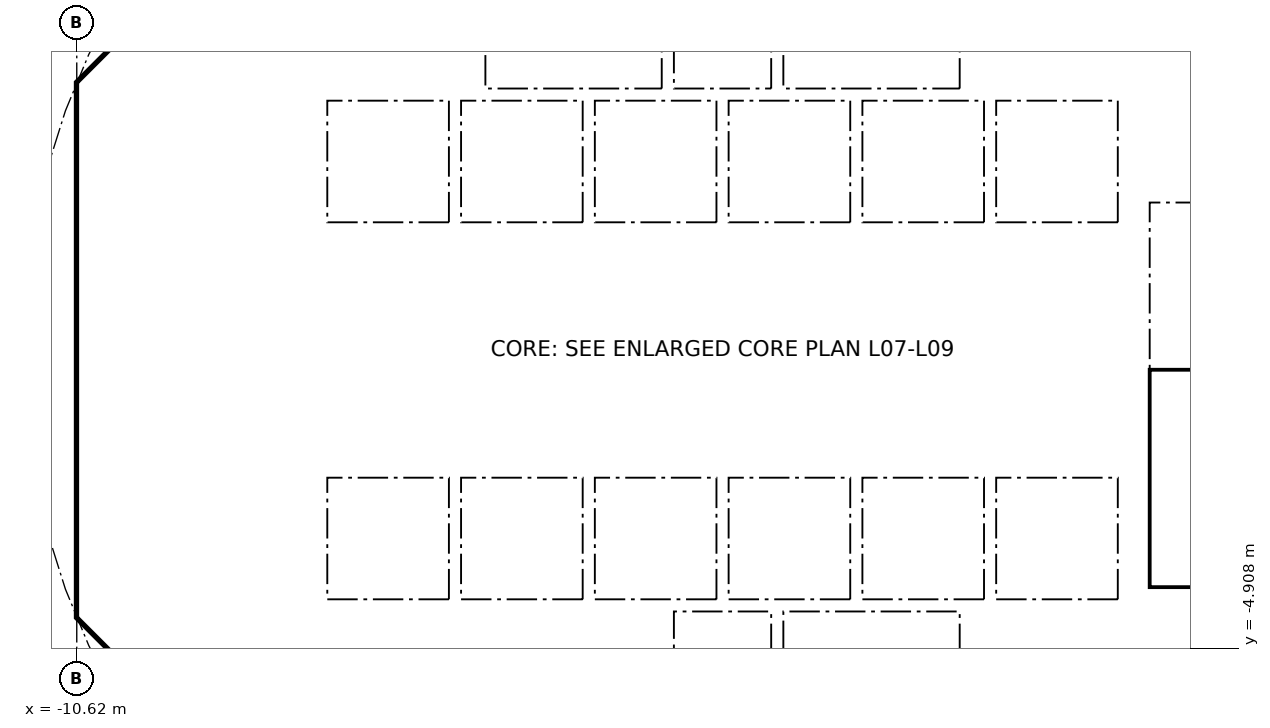
"""IFC4 building model, lengths in metres.
Left out: names, types, materials, properties, quantities, classifications, styles, units other than length and angle.
Written with IfcOpenShell. Run it as: python <this file> out.ifc"""

import sys

from ifc_helpers import new_model, si_unit, direction, frame, frame_2d, origin, place, context, subcontext, project, spatial, polyline, rectangle, outline, extrude, element, fill, save


model = new_model("IFC4")
c1 = context("Model", 3, precision=1e-05, world=origin(), true_north=direction((0.0, 1.0)))
c2 = subcontext(c1, "Body", "Model", "MODEL_VIEW")
j1 = project(units=[si_unit("LENGTHUNIT", "METRE"), si_unit("PLANEANGLEUNIT", "RADIAN")], contexts=[c1])
p1 = place(None, origin())
s1 = spatial("IfcSite", under=j1, at=p1, CompositionType="ELEMENT")
p2 = place(p1, origin())
s2 = spatial("IfcBuilding", under=s1, at=p2, CompositionType="ELEMENT")
p3 = place(p2, frame((0.0, 0.0, 41.8)))
s3 = spatial("IfcBuildingStorey", under=s2, at=p3, CompositionType="ELEMENT", Elevation=41.8)
p4 = place(p3, frame((9.988, 4.613, 0.0), z_axis=(0.0, 0.0, 1.0), x_axis=(-0.707106781187, 0.707106781187, 0.0)))
e1 = element("IfcWall", 1, at=p4, inside=s3, PredefinedType="SHEAR", context=c2, shape_type="SweptSolid", body=[
    extrude(rectangle(XDim=7.602, YDim=0.6, at=frame_2d((3.801, 0.0))), origin(), (0.0, 0.0, 1.0), 3.44),
])
p5 = place(p4, frame((3.201, 0.0, 0.0)))
e2 = element("IfcOpeningElement", 2, at=p5, cuts=e1, PredefinedType="OPENING", context=c2, shape_type="SweptSolid", body=[
    extrude(rectangle(XDim=1.2, YDim=2.1, at=frame_2d((0.6, 1.05))), frame((0.0, 0.31, 0.0), z_axis=(0.0, -1.0, 0.0), x_axis=(1.0, 0.0, 0.0)), (0.0, 0.0, 1.0), 0.62),
])
p6 = place(p3, frame((-4.613, 9.988, 0.0), z_axis=(0.0, 0.0, 1.0), x_axis=(-0.707106781187, -0.707106781187, 0.0)))
e3 = element("IfcWall", 3, at=p6, inside=s3, PredefinedType="SHEAR", context=c2, shape_type="SweptSolid", body=[
    extrude(rectangle(XDim=7.602, YDim=0.6, at=frame_2d((3.801, 0.0))), origin(), (0.0, 0.0, 1.0), 3.44),
])
p7 = place(p6, frame((0.351, 0.0, 0.0)))
e4 = element("IfcOpeningElement", 4, at=p7, cuts=e3, PredefinedType="OPENING", context=c2, shape_type="SweptSolid", body=[
    extrude(rectangle(XDim=1.1, YDim=2.1, at=frame_2d((0.55, 1.05))), frame((0.0, 0.31, 0.0), z_axis=(0.0, -1.0, 0.0), x_axis=(1.0, 0.0, 0.0)), (0.0, 0.0, 1.0), 0.62),
])
p8 = place(p3, frame((-10.325, 3.801, 0.0), z_axis=(0.0, 0.0, 1.0), x_axis=(0.0, -1.0, 0.0)))
e5 = element("IfcWall", 5, at=p8, inside=s3, PredefinedType="SHEAR", context=c2, shape_type="SweptSolid", body=[
    extrude(rectangle(XDim=7.602, YDim=0.6, at=frame_2d((3.801, 0.0))), origin(), (0.0, 0.0, 1.0), 3.44),
])
p9 = place(p8, frame((0.651, 0.0, 0.0)))
e6 = element("IfcOpeningElement", 6, at=p9, cuts=e5, PredefinedType="OPENING", context=c2, shape_type="SweptSolid", body=[
    extrude(rectangle(XDim=1.5, YDim=2.1, at=frame_2d((0.75, 1.05))), frame((0.0, 0.31, 0.0), z_axis=(0.0, -1.0, 0.0), x_axis=(1.0, 0.0, 0.0)), (0.0, 0.0, 1.0), 0.62),
])
p10 = place(p8, frame((5.451, 0.0, 0.0)))
e7 = element("IfcOpeningElement", 7, at=p10, cuts=e5, PredefinedType="OPENING", context=c2, shape_type="SweptSolid", body=[
    extrude(rectangle(XDim=1.5, YDim=2.1, at=frame_2d((0.75, 1.05))), frame((0.0, 0.31, 0.0), z_axis=(0.0, -1.0, 0.0), x_axis=(1.0, 0.0, 0.0)), (0.0, 0.0, 1.0), 0.62),
])
p11 = place(p3, frame((-9.988, -4.613, 0.0), z_axis=(0.0, 0.0, 1.0), x_axis=(0.707106781187, -0.707106781187, 0.0)))
e8 = element("IfcWall", 8, at=p11, inside=s3, PredefinedType="SHEAR", context=c2, shape_type="SweptSolid", body=[
    extrude(rectangle(XDim=7.602, YDim=0.6, at=frame_2d((3.801, 0.0))), origin(), (0.0, 0.0, 1.0), 3.44),
])
p12 = place(p11, frame((6.151, 0.0, 0.0)))
e9 = element("IfcOpeningElement", 9, at=p12, cuts=e8, PredefinedType="OPENING", context=c2, shape_type="SweptSolid", body=[
    extrude(rectangle(XDim=1.1, YDim=2.1, at=frame_2d((0.55, 1.05))), frame((0.0, 0.31, 0.0), z_axis=(0.0, -1.0, 0.0), x_axis=(1.0, 0.0, 0.0)), (0.0, 0.0, 1.0), 0.62),
])
p13 = place(p3, frame((4.613, -9.988, 0.0), z_axis=(0.0, 0.0, 1.0), x_axis=(0.707106781187, 0.707106781187, 0.0)))
e10 = element("IfcWall", 10, at=p13, inside=s3, PredefinedType="SHEAR", context=c2, shape_type="SweptSolid", body=[
    extrude(rectangle(XDim=7.602, YDim=0.6, at=frame_2d((3.801, 0.0))), origin(), (0.0, 0.0, 1.0), 3.44),
])
p14 = place(p13, frame((3.201, 0.0, 0.0)))
e11 = element("IfcOpeningElement", 11, at=p14, cuts=e10, PredefinedType="OPENING", context=c2, shape_type="SweptSolid", body=[
    extrude(rectangle(XDim=1.2, YDim=2.1, at=frame_2d((0.6, 1.05))), frame((0.0, 0.31, 0.0), z_axis=(0.0, -1.0, 0.0), x_axis=(1.0, 0.0, 0.0)), (0.0, 0.0, 1.0), 0.62),
])
p15 = place(p3, frame((-6.2, 4.3, 0.0), z_axis=(0.0, 0.0, 1.0), x_axis=(0.0, 1.0, 0.0)))
e12 = element("IfcWall", 12, at=p15, inside=s3, PredefinedType="PARTITIONING", context=c2, shape_type="SweptSolid", body=[
    extrude(rectangle(XDim=3.527, YDim=0.15, at=frame_2d((1.763, 0.0))), origin(), (0.0, 0.0, 1.0), 3.44),
])
p16 = place(p15, frame((0.262, 0.0, 0.0)))
e13 = element("IfcOpeningElement", 13, at=p16, cuts=e12, PredefinedType="OPENING", context=c2, shape_type="SweptSolid", body=[
    extrude(rectangle(XDim=0.9, YDim=2.1, at=frame_2d((0.45, 1.05))), frame((0.0, 0.085, 0.0), z_axis=(0.0, -1.0, 0.0), x_axis=(1.0, 0.0, 0.0)), (0.0, 0.0, 1.0), 0.17),
])
p17 = place(p15, frame((2.138, 0.0, 0.0)))
e14 = element("IfcOpeningElement", 14, at=p17, cuts=e12, PredefinedType="OPENING", context=c2, shape_type="SweptSolid", body=[
    extrude(rectangle(XDim=0.9, YDim=2.1, at=frame_2d((0.45, 1.05))), frame((0.0, 0.085, 0.0), z_axis=(0.0, -1.0, 0.0), x_axis=(1.0, 0.0, 0.0)), (0.0, 0.0, 1.0), 0.17),
])
p18 = place(p3, frame((4.0, 4.3, 0.0), z_axis=(0.0, 0.0, 1.0), x_axis=(0.0, 1.0, 0.0)))
e15 = element("IfcWall", 15, at=p18, inside=s3, PredefinedType="SOLIDWALL", context=c2, shape_type="SweptSolid", body=[
    extrude(rectangle(XDim=2.2, YDim=0.2, at=frame_2d((1.1, 0.0))), origin(), (0.0, 0.0, 1.0), 3.44),
])
p19 = place(p18, frame((0.55, 0.0, 0.0)))
e16 = element("IfcOpeningElement", 16, at=p19, cuts=e15, PredefinedType="OPENING", context=c2, shape_type="SweptSolid", body=[
    extrude(rectangle(XDim=1.1, YDim=2.1, at=frame_2d((0.55, 1.05))), frame((0.0, 0.11, 0.0), z_axis=(0.0, -1.0, 0.0), x_axis=(1.0, 0.0, 0.0)), (0.0, 0.0, 1.0), 0.22),
])
p20 = place(p3, frame((-4.0, 4.3, 0.0), z_axis=(0.0, 0.0, 1.0), x_axis=(0.0, 1.0, 0.0)))
e17 = element("IfcWall", 17, at=p20, inside=s3, PredefinedType="SOLIDWALL", context=c2, shape_type="SweptSolid", body=[
    extrude(rectangle(XDim=2.2, YDim=0.2, at=frame_2d((1.1, 0.0))), origin(), (0.0, 0.0, 1.0), 3.44),
])
p21 = place(p20, frame((0.55, 0.0, 0.0)))
e18 = element("IfcOpeningElement", 18, at=p21, cuts=e17, PredefinedType="OPENING", context=c2, shape_type="SweptSolid", body=[
    extrude(rectangle(XDim=1.1, YDim=2.1, at=frame_2d((0.55, 1.05))), frame((0.0, 0.11, 0.0), z_axis=(0.0, -1.0, 0.0), x_axis=(1.0, 0.0, 0.0)), (0.0, 0.0, 1.0), 0.22),
])
p22 = place(p3, frame((-6.7, 2.0, 0.0), z_axis=(0.0, 0.0, 1.0), x_axis=(1.0, 0.0, 0.0)))
e19 = element("IfcWall", 19, at=p22, inside=s3, PredefinedType="SOLIDWALL", context=c2, shape_type="SweptSolid", body=[
    extrude(rectangle(XDim=13.4, YDim=0.2, at=frame_2d((6.7, 0.0))), origin(), (0.0, 0.0, 1.0), 3.44),
])
p23 = place(p22, frame((0.65, 0.0, 0.0)))
e20 = element("IfcOpeningElement", 20, at=p23, cuts=e19, PredefinedType="OPENING", context=c2, shape_type="SweptSolid", body=[
    extrude(rectangle(XDim=1.1, YDim=2.1, at=frame_2d((0.55, 1.05))), frame((0.0, 0.11, 0.0), z_axis=(0.0, -1.0, 0.0), x_axis=(1.0, 0.0, 0.0)), (0.0, 0.0, 1.0), 0.22),
])
p24 = place(p22, frame((2.85, 0.0, 0.0)))
e21 = element("IfcOpeningElement", 21, at=p24, cuts=e19, PredefinedType="OPENING", context=c2, shape_type="SweptSolid", body=[
    extrude(rectangle(XDim=1.1, YDim=2.1, at=frame_2d((0.55, 1.05))), frame((0.0, 0.11, 0.0), z_axis=(0.0, -1.0, 0.0), x_axis=(1.0, 0.0, 0.0)), (0.0, 0.0, 1.0), 0.22),
])
p25 = place(p22, frame((5.05, 0.0, 0.0)))
e22 = element("IfcOpeningElement", 22, at=p25, cuts=e19, PredefinedType="OPENING", context=c2, shape_type="SweptSolid", body=[
    extrude(rectangle(XDim=1.1, YDim=2.1, at=frame_2d((0.55, 1.05))), frame((0.0, 0.11, 0.0), z_axis=(0.0, -1.0, 0.0), x_axis=(1.0, 0.0, 0.0)), (0.0, 0.0, 1.0), 0.22),
])
p26 = place(p3, frame((6.7, 4.0, 0.0), z_axis=(0.0, 0.0, 1.0), x_axis=(1.0, 0.0, 0.0)))
e23 = element("IfcWall", 23, at=p26, inside=s3, PredefinedType="SOLIDWALL", context=c2, shape_type="SweptSolid", body=[
    extrude(rectangle(XDim=3.325, YDim=0.2, at=frame_2d((1.662, 0.0))), origin(), (0.0, 0.0, 1.0), 3.44),
])
p27 = place(p26, frame((1.25, 0.0, 0.0)))
e24 = element("IfcOpeningElement", 24, at=p27, cuts=e23, PredefinedType="OPENING", context=c2, shape_type="SweptSolid", body=[
    extrude(rectangle(XDim=1.1, YDim=2.1, at=frame_2d((0.55, 1.05))), frame((0.0, 0.11, 0.0), z_axis=(0.0, -1.0, 0.0), x_axis=(1.0, 0.0, 0.0)), (0.0, 0.0, 1.0), 0.22),
])
p28 = place(p3, frame((-6.2, -7.827, 0.0), z_axis=(0.0, 0.0, 1.0), x_axis=(0.0, 1.0, 0.0)))
e25 = element("IfcWall", 25, at=p28, inside=s3, PredefinedType="PARTITIONING", context=c2, shape_type="SweptSolid", body=[
    extrude(rectangle(XDim=3.527, YDim=0.15, at=frame_2d((1.763, 0.0))), origin(), (0.0, 0.0, 1.0), 3.44),
])
p29 = place(p28, frame((2.365, 0.0, 0.0)))
e26 = element("IfcOpeningElement", 26, at=p29, cuts=e25, PredefinedType="OPENING", context=c2, shape_type="SweptSolid", body=[
    extrude(rectangle(XDim=0.9, YDim=2.1, at=frame_2d((0.45, 1.05))), frame((0.0, 0.085, 0.0), z_axis=(0.0, -1.0, 0.0), x_axis=(1.0, 0.0, 0.0)), (0.0, 0.0, 1.0), 0.17),
])
p30 = place(p28, frame((0.489, 0.0, 0.0)))
e27 = element("IfcOpeningElement", 27, at=p30, cuts=e25, PredefinedType="OPENING", context=c2, shape_type="SweptSolid", body=[
    extrude(rectangle(XDim=0.9, YDim=2.1, at=frame_2d((0.45, 1.05))), frame((0.0, 0.085, 0.0), z_axis=(0.0, -1.0, 0.0), x_axis=(1.0, 0.0, 0.0)), (0.0, 0.0, 1.0), 0.17),
])
p31 = place(p3, frame((4.0, -6.5, 0.0), z_axis=(0.0, 0.0, 1.0), x_axis=(0.0, 1.0, 0.0)))
e28 = element("IfcWall", 28, at=p31, inside=s3, PredefinedType="SOLIDWALL", context=c2, shape_type="SweptSolid", body=[
    extrude(rectangle(XDim=2.2, YDim=0.2, at=frame_2d((1.1, 0.0))), origin(), (0.0, 0.0, 1.0), 3.44),
])
p32 = place(p31, frame((0.55, 0.0, 0.0)))
e29 = element("IfcOpeningElement", 29, at=p32, cuts=e28, PredefinedType="OPENING", context=c2, shape_type="SweptSolid", body=[
    extrude(rectangle(XDim=1.1, YDim=2.1, at=frame_2d((0.55, 1.05))), frame((0.0, 0.11, 0.0), z_axis=(0.0, -1.0, 0.0), x_axis=(1.0, 0.0, 0.0)), (0.0, 0.0, 1.0), 0.22),
])
p33 = place(p3, frame((-4.0, -6.5, 0.0), z_axis=(0.0, 0.0, 1.0), x_axis=(0.0, 1.0, 0.0)))
e30 = element("IfcWall", 30, at=p33, inside=s3, PredefinedType="SOLIDWALL", context=c2, shape_type="SweptSolid", body=[
    extrude(rectangle(XDim=2.2, YDim=0.2, at=frame_2d((1.1, 0.0))), origin(), (0.0, 0.0, 1.0), 3.44),
])
p34 = place(p33, frame((0.65, 0.0, 0.0)))
e31 = element("IfcOpeningElement", 31, at=p34, cuts=e30, PredefinedType="OPENING", context=c2, shape_type="SweptSolid", body=[
    extrude(rectangle(XDim=0.9, YDim=2.1, at=frame_2d((0.45, 1.05))), frame((0.0, 0.11, 0.0), z_axis=(0.0, -1.0, 0.0), x_axis=(1.0, 0.0, 0.0)), (0.0, 0.0, 1.0), 0.22),
])
p35 = place(p3, frame((-6.7, -2.0, 0.0), z_axis=(0.0, 0.0, 1.0), x_axis=(1.0, 0.0, 0.0)))
e32 = element("IfcWall", 32, at=p35, inside=s3, PredefinedType="SOLIDWALL", context=c2, shape_type="SweptSolid", body=[
    extrude(rectangle(XDim=13.4, YDim=0.2, at=frame_2d((6.7, 0.0))), origin(), (0.0, 0.0, 1.0), 3.44),
])
p36 = place(p35, frame((0.65, 0.0, 0.0)))
e33 = element("IfcOpeningElement", 33, at=p36, cuts=e32, PredefinedType="OPENING", context=c2, shape_type="SweptSolid", body=[
    extrude(rectangle(XDim=1.1, YDim=2.1, at=frame_2d((0.55, 1.05))), frame((0.0, 0.11, 0.0), z_axis=(0.0, -1.0, 0.0), x_axis=(1.0, 0.0, 0.0)), (0.0, 0.0, 1.0), 0.22),
])
p37 = place(p35, frame((2.85, 0.0, 0.0)))
e34 = element("IfcOpeningElement", 34, at=p37, cuts=e32, PredefinedType="OPENING", context=c2, shape_type="SweptSolid", body=[
    extrude(rectangle(XDim=1.1, YDim=2.1, at=frame_2d((0.55, 1.05))), frame((0.0, 0.11, 0.0), z_axis=(0.0, -1.0, 0.0), x_axis=(1.0, 0.0, 0.0)), (0.0, 0.0, 1.0), 0.22),
])
p38 = place(p3, origin())
e35 = element("IfcWall", 35, at=p38, inside=s3, PredefinedType="SHEAR", context=c2, shape_type="SweptSolid", body=[
    extrude(outline(polyline([(-10.625, -3.801), (-10.025, -3.801), (-10.025, -4.152), (-9.776, -4.401), (-10.2, -4.825), (-10.625, -4.401), (-10.625, -3.801)])), origin(), (0.0, 0.0, 1.0), 3.44),
])
p39 = place(p3, origin())
e36 = element("IfcWall", 36, at=p39, inside=s3, PredefinedType="SHEAR", context=c2, shape_type="SweptSolid", body=[
    extrude(outline(polyline([(-10.2, 4.825), (-9.776, 4.401), (-10.025, 4.152), (-10.025, 3.801), (-10.625, 3.801), (-10.625, 4.401), (-10.2, 4.825)])), origin(), (0.0, 0.0, 1.0), 3.44),
])
for number, where, z_axis, x_axis in (
    (37, (-10.025, -4.0, 0.0), (0.0, 0.0, 1.0), (1.0, 0.0, 0.0)),
    (38, (-10.025, 4.0, 0.0), (0.0, 0.0, 1.0), (1.0, 0.0, 0.0)),
):
    element("IfcWall", number, at=place(p3, frame(where, z_axis=z_axis, x_axis=x_axis)), inside=s3, PredefinedType="PARTITIONING", context=c2, shape_type="SweptSolid", body=[
        extrude(rectangle(XDim=3.325, YDim=0.2, at=frame_2d((1.662, 0.0))), origin(), (0.0, 0.0, 1.0), 3.44),
    ])
for number, where, z_axis, x_axis in (
    (39, (-0.9, -6.5, 0.0), (0.0, 0.0, 1.0), (0.0, 1.0, 0.0)),
    (40, (0.9, -6.5, 0.0), (0.0, 0.0, 1.0), (0.0, 1.0, 0.0)),
):
    element("IfcWall", number, at=place(p3, frame(where, z_axis=z_axis, x_axis=x_axis)), inside=s3, PredefinedType="SOLIDWALL", context=c2, shape_type="SweptSolid", body=[
        extrude(rectangle(XDim=2.2, YDim=0.2, at=frame_2d((1.1, 0.0))), origin(), (0.0, 0.0, 1.0), 3.44),
    ])
p40 = place(p3, origin())
e41 = element("IfcWall", 41, at=p40, inside=s3, PredefinedType="SOLIDWALL", context=c2, shape_type="SweptSolid", body=[
    extrude(outline(polyline([(-6.7, -2.1), (-6.5, -2.1), (-6.5, -4.1), (-4.5, -4.1), (-4.5, -2.1), (-4.3, -2.1), (-4.3, -4.1), (-2.3, -4.1), (-2.3, -2.1), (-2.1, -2.1), (-2.1, -4.1), (-0.1, -4.1), (-0.1, -2.1), (0.1, -2.1), (0.1, -4.1), (2.1, -4.1), (2.1, -2.1), (2.3, -2.1), (2.3, -4.1), (4.3, -4.1), (4.3, -2.1), (4.5, -2.1), (4.5, -4.1), (6.5, -4.1), (6.5, -2.1), (6.7, -2.1), (6.7, -4.3), (-6.7, -4.3), (-6.7, -2.1)])), origin(), (0.0, 0.0, 1.0), 3.44),
])
for number, where, z_axis, x_axis in (
    (42, (-0.9, 4.3, 0.0), (0.0, 0.0, 1.0), (0.0, 1.0, 0.0)),
    (43, (0.9, 4.3, 0.0), (0.0, 0.0, 1.0), (0.0, 1.0, 0.0)),
):
    element("IfcWall", number, at=place(p3, frame(where, z_axis=z_axis, x_axis=x_axis)), inside=s3, PredefinedType="SOLIDWALL", context=c2, shape_type="SweptSolid", body=[
        extrude(rectangle(XDim=2.2, YDim=0.2, at=frame_2d((1.1, 0.0))), origin(), (0.0, 0.0, 1.0), 3.44),
    ])
p41 = place(p3, origin())
e44 = element("IfcWall", 44, at=p41, inside=s3, PredefinedType="SOLIDWALL", context=c2, shape_type="SweptSolid", body=[
    extrude(outline(polyline([(-6.5, 2.1), (-6.7, 2.1), (-6.7, 4.3), (6.7, 4.3), (6.7, 2.1), (6.5, 2.1), (6.5, 4.1), (4.5, 4.1), (4.5, 2.1), (4.3, 2.1), (4.3, 4.1), (2.3, 4.1), (2.3, 2.1), (2.1, 2.1), (2.1, 4.1), (0.1, 4.1), (0.1, 2.1), (-0.1, 2.1), (-0.1, 4.1), (-2.1, 4.1), (-2.1, 2.1), (-2.3, 2.1), (-2.3, 4.1), (-4.3, 4.1), (-4.3, 2.1), (-4.5, 2.1), (-4.5, 4.1), (-6.5, 4.1), (-6.5, 2.1)])), origin(), (0.0, 0.0, 1.0), 3.44),
])
p42 = place(p3, origin())
e45 = element("IfcWall", 45, at=p42, inside=s3, PredefinedType="SOLIDWALL", context=c2, shape_type="SweptSolid", body=[
    extrude(outline(polyline([(7.025, -3.9), (6.7, -3.9), (6.7, 3.9), (7.025, 3.9), (7.025, -3.9)])), origin(), (0.0, 0.0, 1.0), 3.44),
])
p43 = place(p3, origin())
e46 = element("IfcWall", 46, at=p43, inside=s3, PredefinedType="SOLIDWALL", context=c2, shape_type="SweptSolid", body=[
    extrude(outline(polyline([(10.025, -4.1), (6.7, -4.1), (6.7, -3.9), (10.025, -3.9), (10.025, -4.1)])), origin(), (0.0, 0.0, 1.0), 3.44),
])
p44 = place(p23, origin())
e47 = element("IfcDoor", 47, at=p44, inside=s3, OperationType="DOUBLE_DOOR_SLIDING", PredefinedType="DOOR", context=c2, shape_type="SweptSolid", body=[
    extrude(rectangle(XDim=1.1, YDim=2.1, at=frame_2d((0.55, 1.05))), frame((0.0, 0.025, 0.0), z_axis=(0.0, -1.0, 0.0), x_axis=(1.0, 0.0, 0.0)), (0.0, 0.0, 1.0), 0.05),
])
fill(e20, e47)
p45 = place(p24, origin())
e48 = element("IfcDoor", 48, at=p45, inside=s3, OperationType="DOUBLE_DOOR_SLIDING", PredefinedType="DOOR", context=c2, shape_type="SweptSolid", body=[
    extrude(rectangle(XDim=1.1, YDim=2.1, at=frame_2d((0.55, 1.05))), frame((0.0, 0.025, 0.0), z_axis=(0.0, -1.0, 0.0), x_axis=(1.0, 0.0, 0.0)), (0.0, 0.0, 1.0), 0.05),
])
fill(e21, e48)
p46 = place(p25, origin())
e49 = element("IfcDoor", 49, at=p46, inside=s3, OperationType="DOUBLE_DOOR_SLIDING", PredefinedType="DOOR", context=c2, shape_type="SweptSolid", body=[
    extrude(rectangle(XDim=1.1, YDim=2.1, at=frame_2d((0.55, 1.05))), frame((0.0, 0.025, 0.0), z_axis=(0.0, -1.0, 0.0), x_axis=(1.0, 0.0, 0.0)), (0.0, 0.0, 1.0), 0.05),
])
fill(e22, e49)
p47 = place(p36, origin())
e50 = element("IfcDoor", 50, at=p47, inside=s3, OperationType="DOUBLE_DOOR_SLIDING", PredefinedType="DOOR", context=c2, shape_type="SweptSolid", body=[
    extrude(rectangle(XDim=1.1, YDim=2.1, at=frame_2d((0.55, 1.05))), frame((0.0, 0.025, 0.0), z_axis=(0.0, -1.0, 0.0), x_axis=(1.0, 0.0, 0.0)), (0.0, 0.0, 1.0), 0.05),
])
fill(e33, e50)
p48 = place(p37, origin())
e51 = element("IfcDoor", 51, at=p48, inside=s3, OperationType="DOUBLE_DOOR_SLIDING", PredefinedType="DOOR", context=c2, shape_type="SweptSolid", body=[
    extrude(rectangle(XDim=1.1, YDim=2.1, at=frame_2d((0.55, 1.05))), frame((0.0, 0.025, 0.0), z_axis=(0.0, -1.0, 0.0), x_axis=(1.0, 0.0, 0.0)), (0.0, 0.0, 1.0), 0.05),
])
fill(e34, e51)
p49 = place(p19, origin())
e52 = element("IfcDoor", 52, at=p49, inside=s3, OperationType="DOUBLE_DOOR_SLIDING", PredefinedType="DOOR", context=c2, shape_type="SweptSolid", body=[
    extrude(rectangle(XDim=1.1, YDim=2.1, at=frame_2d((0.55, 1.05))), frame((0.0, 0.025, 0.0), z_axis=(0.0, -1.0, 0.0), x_axis=(1.0, 0.0, 0.0)), (0.0, 0.0, 1.0), 0.05),
])
fill(e16, e52)
p50 = place(p32, origin())
e53 = element("IfcDoor", 53, at=p50, inside=s3, OperationType="DOUBLE_DOOR_SLIDING", PredefinedType="DOOR", context=c2, shape_type="SweptSolid", body=[
    extrude(rectangle(XDim=1.1, YDim=2.1, at=frame_2d((0.55, 1.05))), frame((0.0, 0.025, 0.0), z_axis=(0.0, -1.0, 0.0), x_axis=(1.0, 0.0, 0.0)), (0.0, 0.0, 1.0), 0.05),
])
fill(e29, e53)
p51 = place(p21, origin())
e54 = element("IfcDoor", 54, at=p51, inside=s3, OperationType="DOUBLE_DOOR_SLIDING", PredefinedType="DOOR", context=c2, shape_type="SweptSolid", body=[
    extrude(rectangle(XDim=1.1, YDim=2.1, at=frame_2d((0.55, 1.05))), frame((0.0, 0.025, 0.0), z_axis=(0.0, -1.0, 0.0), x_axis=(1.0, 0.0, 0.0)), (0.0, 0.0, 1.0), 0.05),
])
fill(e18, e54)
p52 = place(p16, origin())
e55 = element("IfcDoor", 55, at=p52, inside=s3, OperationType="SINGLE_SWING_RIGHT", PredefinedType="DOOR", context=c2, shape_type="SweptSolid", body=[
    extrude(rectangle(XDim=0.9, YDim=2.1, at=frame_2d((0.45, 1.05))), frame((0.0, 0.025, 0.0), z_axis=(0.0, -1.0, 0.0), x_axis=(1.0, 0.0, 0.0)), (0.0, 0.0, 1.0), 0.05),
])
fill(e13, e55)
p53 = place(p29, origin())
e56 = element("IfcDoor", 56, at=p53, inside=s3, OperationType="SINGLE_SWING_RIGHT", PredefinedType="DOOR", context=c2, shape_type="SweptSolid", body=[
    extrude(rectangle(XDim=0.9, YDim=2.1, at=frame_2d((0.45, 1.05))), frame((0.0, 0.025, 0.0), z_axis=(0.0, -1.0, 0.0), x_axis=(1.0, 0.0, 0.0)), (0.0, 0.0, 1.0), 0.05),
])
fill(e26, e56)
p54 = place(p9, origin())
e57 = element("IfcDoor", 57, at=p54, inside=s3, OperationType="DOUBLE_DOOR_SINGLE_SWING", PredefinedType="DOOR", context=c2, shape_type="SweptSolid", body=[
    extrude(rectangle(XDim=1.5, YDim=2.1, at=frame_2d((0.75, 1.05))), frame((0.0, 0.025, 0.0), z_axis=(0.0, -1.0, 0.0), x_axis=(1.0, 0.0, 0.0)), (0.0, 0.0, 1.0), 0.05),
])
fill(e6, e57)
p55 = place(p10, origin())
e58 = element("IfcDoor", 58, at=p55, inside=s3, OperationType="DOUBLE_DOOR_SINGLE_SWING", PredefinedType="DOOR", context=c2, shape_type="SweptSolid", body=[
    extrude(rectangle(XDim=1.5, YDim=2.1, at=frame_2d((0.75, 1.05))), frame((0.0, 0.025, 0.0), z_axis=(0.0, -1.0, 0.0), x_axis=(1.0, 0.0, 0.0)), (0.0, 0.0, 1.0), 0.05),
])
fill(e7, e58)
save(model, sys.argv[1])
